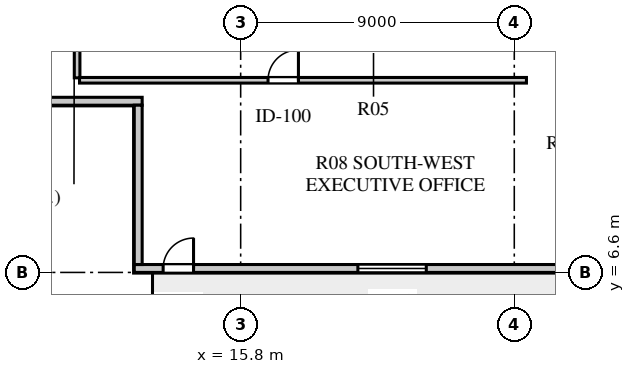
"""IFC4 building model, lengths in metres.
Left out: names, types, materials, properties, quantities, classifications, styles, units other than length and angle.
Written with IfcOpenShell. Run it as: python <this file> out.ifc"""

import sys

from ifc_helpers import new_model, si_unit, direction, frame, frame_2d, origin, place, context, subcontext, project, spatial, rectangle, extrude, element, fill, save


model = new_model("IFC4")
c1 = context("Model", 3, precision=1e-05, world=origin(), true_north=direction((0.0, 1.0)))
c2 = subcontext(c1, "Body", "Model", "MODEL_VIEW")
j1 = project(units=[si_unit("LENGTHUNIT", "METRE"), si_unit("PLANEANGLEUNIT", "RADIAN")], contexts=[c1])
p1 = place(None, origin())
s1 = spatial("IfcSite", under=j1, at=p1, CompositionType="ELEMENT")
p2 = place(p1, origin())
s2 = spatial("IfcBuilding", under=s1, at=p2, CompositionType="ELEMENT")
p3 = place(p2, frame((0.0, 0.0, 74.0)))
s3 = spatial("IfcBuildingStorey", under=s2, at=p3, CompositionType="ELEMENT", Elevation=74.0)
p4 = place(p3, frame((12.3, 6.73, 0.0), z_axis=(0.0, 0.0, 1.0), x_axis=(1.0, 0.0, 0.0)))
e1 = element("IfcWall", 1, at=p4, inside=s3, PredefinedType="SOLIDWALL", context=c2, shape_type="SweptSolid", body=[
    extrude(rectangle(XDim=34.0, YDim=0.26, at=frame_2d((17.0, 0.0))), origin(), (0.0, 0.0, 1.0), 3.72),
])
p5 = place(p4, frame((0.95, 0.0, 0.0)))
e2 = element("IfcOpeningElement", 2, at=p5, cuts=e1, PredefinedType="OPENING", context=c2, shape_type="SweptSolid", body=[
    extrude(rectangle(XDim=1.0, YDim=2.05, at=frame_2d((0.5, 1.025))), frame((0.0, 0.14, 0.0), z_axis=(0.0, -1.0, 0.0), x_axis=(1.0, 0.0, 0.0)), (0.0, 0.0, 1.0), 0.28),
])
p6 = place(p4, frame((7.355, 0.0, 0.8)))
e3 = element("IfcOpeningElement", 3, at=p6, cuts=e1, PredefinedType="OPENING", context=c2, shape_type="SweptSolid", body=[
    extrude(rectangle(XDim=2.25, YDim=2.0, at=frame_2d((1.125, 1.0))), frame((0.0, 0.14, 0.0), z_axis=(0.0, -1.0, 0.0), x_axis=(1.0, 0.0, 0.0)), (0.0, 0.0, 1.0), 0.28),
])
p7 = place(p4, frame((15.85, 0.0, 0.8)))
e4 = element("IfcOpeningElement", 4, at=p7, cuts=e1, PredefinedType="OPENING", context=c2, shape_type="SweptSolid", body=[
    extrude(rectangle(XDim=1.2, YDim=1.75, at=frame_2d((0.6, 0.875))), frame((0.0, 0.14, 0.0), z_axis=(0.0, -1.0, 0.0), x_axis=(1.0, 0.0, 0.0)), (0.0, 0.0, 1.0), 0.28),
])
p8 = place(p4, frame((18.15, 0.0, 0.8)))
e5 = element("IfcOpeningElement", 5, at=p8, cuts=e1, PredefinedType="OPENING", context=c2, shape_type="SweptSolid", body=[
    extrude(rectangle(XDim=1.2, YDim=1.75, at=frame_2d((0.6, 0.875))), frame((0.0, 0.14, 0.0), z_axis=(0.0, -1.0, 0.0), x_axis=(1.0, 0.0, 0.0)), (0.0, 0.0, 1.0), 0.28),
])
p9 = place(p4, frame((20.45, 0.0, 0.8)))
e6 = element("IfcOpeningElement", 6, at=p9, cuts=e1, PredefinedType="OPENING", context=c2, shape_type="SweptSolid", body=[
    extrude(rectangle(XDim=1.2, YDim=1.75, at=frame_2d((0.6, 0.875))), frame((0.0, 0.14, 0.0), z_axis=(0.0, -1.0, 0.0), x_axis=(1.0, 0.0, 0.0)), (0.0, 0.0, 1.0), 0.28),
])
p10 = place(p4, frame((28.655, 0.0, 0.8)))
e7 = element("IfcOpeningElement", 7, at=p10, cuts=e1, PredefinedType="OPENING", context=c2, shape_type="SweptSolid", body=[
    extrude(rectangle(XDim=2.4, YDim=2.05, at=frame_2d((1.2, 1.025))), frame((0.0, 0.14, 0.0), z_axis=(0.0, -1.0, 0.0), x_axis=(1.0, 0.0, 0.0)), (0.0, 0.0, 1.0), 0.28),
])
p11 = place(p3, frame((6.8, 12.23, 0.0), z_axis=(0.0, 0.0, 1.0), x_axis=(1.0, 0.0, 0.0)))
e8 = element("IfcWall", 8, at=p11, inside=s3, PredefinedType="SOLIDWALL", context=c2, shape_type="SweptSolid", body=[
    extrude(rectangle(XDim=5.76, YDim=0.26, at=frame_2d((2.88, 0.0))), origin(), (0.0, 0.0, 1.0), 3.72),
])
p12 = place(p3, frame((12.43, 12.1, 0.0), z_axis=(0.0, 0.0, 1.0), x_axis=(0.0, -1.0, 0.0)))
e9 = element("IfcWall", 9, at=p12, inside=s3, PredefinedType="SOLIDWALL", context=c2, shape_type="SweptSolid", body=[
    extrude(rectangle(XDim=5.24, YDim=0.26, at=frame_2d((2.62, 0.0))), origin(), (0.0, 0.0, 1.0), 3.72),
])
p13 = place(p3, frame((10.42, 13.0, 0.0), z_axis=(0.0, 0.0, 1.0), x_axis=(0.0, 1.0, 0.0)))
e10 = element("IfcWall", 10, at=p13, inside=s3, PredefinedType="SOLIDWALL", context=c2, shape_type="SweptSolid", body=[
    extrude(rectangle(XDim=31.2, YDim=0.185, at=frame_2d((15.6, 0.0))), origin(), (0.0, 0.0, 1.0), 3.72),
])
p14 = place(p13, frame((3.95, 0.0, 0.0)))
e11 = element("IfcOpeningElement", 11, at=p14, cuts=e10, PredefinedType="OPENING", context=c2, shape_type="SweptSolid", body=[
    extrude(rectangle(XDim=0.95, YDim=2.08, at=frame_2d((0.475, 1.04))), frame((0.0, 0.103, 0.0), z_axis=(0.0, -1.0, 0.0), x_axis=(1.0, 0.0, 0.0)), (0.0, 0.0, 1.0), 0.205),
])
p15 = place(p13, frame((8.5, 0.0, 0.0)))
e12 = element("IfcOpeningElement", 12, at=p15, cuts=e10, PredefinedType="OPENING", context=c2, shape_type="SweptSolid", body=[
    extrude(rectangle(XDim=0.95, YDim=2.08, at=frame_2d((0.475, 1.04))), frame((0.0, 0.103, 0.0), z_axis=(0.0, -1.0, 0.0), x_axis=(1.0, 0.0, 0.0)), (0.0, 0.0, 1.0), 0.205),
])
p16 = place(p13, frame((13.45, 0.0, 0.0)))
e13 = element("IfcOpeningElement", 13, at=p16, cuts=e10, PredefinedType="OPENING", context=c2, shape_type="SweptSolid", body=[
    extrude(rectangle(XDim=0.95, YDim=2.08, at=frame_2d((0.475, 1.04))), frame((0.0, 0.103, 0.0), z_axis=(0.0, -1.0, 0.0), x_axis=(1.0, 0.0, 0.0)), (0.0, 0.0, 1.0), 0.205),
])
p17 = place(p13, frame((18.45, 0.0, 0.0)))
e14 = element("IfcOpeningElement", 14, at=p17, cuts=e10, PredefinedType="OPENING", context=c2, shape_type="SweptSolid", body=[
    extrude(rectangle(XDim=0.95, YDim=2.08, at=frame_2d((0.475, 1.04))), frame((0.0, 0.103, 0.0), z_axis=(0.0, -1.0, 0.0), x_axis=(1.0, 0.0, 0.0)), (0.0, 0.0, 1.0), 0.205),
])
p18 = place(p13, frame((23.05, 0.0, 0.0)))
e15 = element("IfcOpeningElement", 15, at=p18, cuts=e10, PredefinedType="OPENING", context=c2, shape_type="SweptSolid", body=[
    extrude(rectangle(XDim=0.95, YDim=2.08, at=frame_2d((0.475, 1.04))), frame((0.0, 0.103, 0.0), z_axis=(0.0, -1.0, 0.0), x_axis=(1.0, 0.0, 0.0)), (0.0, 0.0, 1.0), 0.205),
])
p19 = place(p13, frame((26.8, 0.0, 0.0)))
e16 = element("IfcOpeningElement", 16, at=p19, cuts=e10, PredefinedType="OPENING", context=c2, shape_type="SweptSolid", body=[
    extrude(rectangle(XDim=0.95, YDim=2.08, at=frame_2d((0.475, 1.04))), frame((0.0, 0.103, 0.0), z_axis=(0.0, -1.0, 0.0), x_axis=(1.0, 0.0, 0.0)), (0.0, 0.0, 1.0), 0.205),
])
p20 = place(p3, frame((10.5, 12.92, 0.0), z_axis=(0.0, 0.0, 1.0), x_axis=(1.0, 0.0, 0.0)))
e17 = element("IfcWall", 17, at=p20, inside=s3, PredefinedType="SOLIDWALL", context=c2, shape_type="SweptSolid", body=[
    extrude(rectangle(XDim=14.7, YDim=0.185, at=frame_2d((7.35, 0.0))), origin(), (0.0, 0.0, 1.0), 3.72),
])
p21 = place(p20, frame((6.2, 0.0, 0.0)))
e18 = element("IfcOpeningElement", 18, at=p21, cuts=e17, PredefinedType="OPENING", context=c2, shape_type="SweptSolid", body=[
    extrude(rectangle(XDim=1.0, YDim=2.08, at=frame_2d((0.5, 1.04))), frame((0.0, 0.103, 0.0), z_axis=(0.0, -1.0, 0.0), x_axis=(1.0, 0.0, 0.0)), (0.0, 0.0, 1.0), 0.205),
])
p22 = place(p5, frame((1.0, 0.0, 0.0), z_axis=(0.0, 0.0, 1.0), x_axis=(-1.0, 0.0, 0.0)))
e19 = element("IfcDoor", 19, at=p22, inside=s3, OperationType="SINGLE_SWING_LEFT", PredefinedType="DOOR", context=c2, shape_type="SweptSolid", body=[
    extrude(rectangle(XDim=1.0, YDim=2.05, at=frame_2d((0.5, 1.025))), frame((0.0, 0.025, 0.0), z_axis=(0.0, -1.0, 0.0), x_axis=(1.0, 0.0, 0.0)), (0.0, 0.0, 1.0), 0.05),
])
fill(e2, e19)
p23 = place(p6, origin())
e20 = element("IfcWindow", 20, at=p23, inside=s3, PartitioningType="SINGLE_PANEL", PredefinedType="WINDOW", context=c2, shape_type="SweptSolid", body=[
    extrude(rectangle(XDim=2.25, YDim=2.0, at=frame_2d((1.125, 1.0))), frame((0.0, 0.03, 0.0), z_axis=(0.0, -1.0, 0.0), x_axis=(1.0, 0.0, 0.0)), (0.0, 0.0, 1.0), 0.06),
])
fill(e3, e20)
p24 = place(p21, frame((1.0, 0.0, 0.0), z_axis=(0.0, 0.0, 1.0), x_axis=(-1.0, 0.0, 0.0)))
e21 = element("IfcDoor", 21, at=p24, inside=s3, OperationType="SINGLE_SWING_LEFT", PredefinedType="DOOR", context=c2, shape_type="SweptSolid", body=[
    extrude(rectangle(XDim=1.0, YDim=2.08, at=frame_2d((0.5, 1.04))), frame((0.0, 0.025, 0.0), z_axis=(0.0, -1.0, 0.0), x_axis=(1.0, 0.0, 0.0)), (0.0, 0.0, 1.0), 0.05),
])
fill(e18, e21)
save(model, sys.argv[1])
